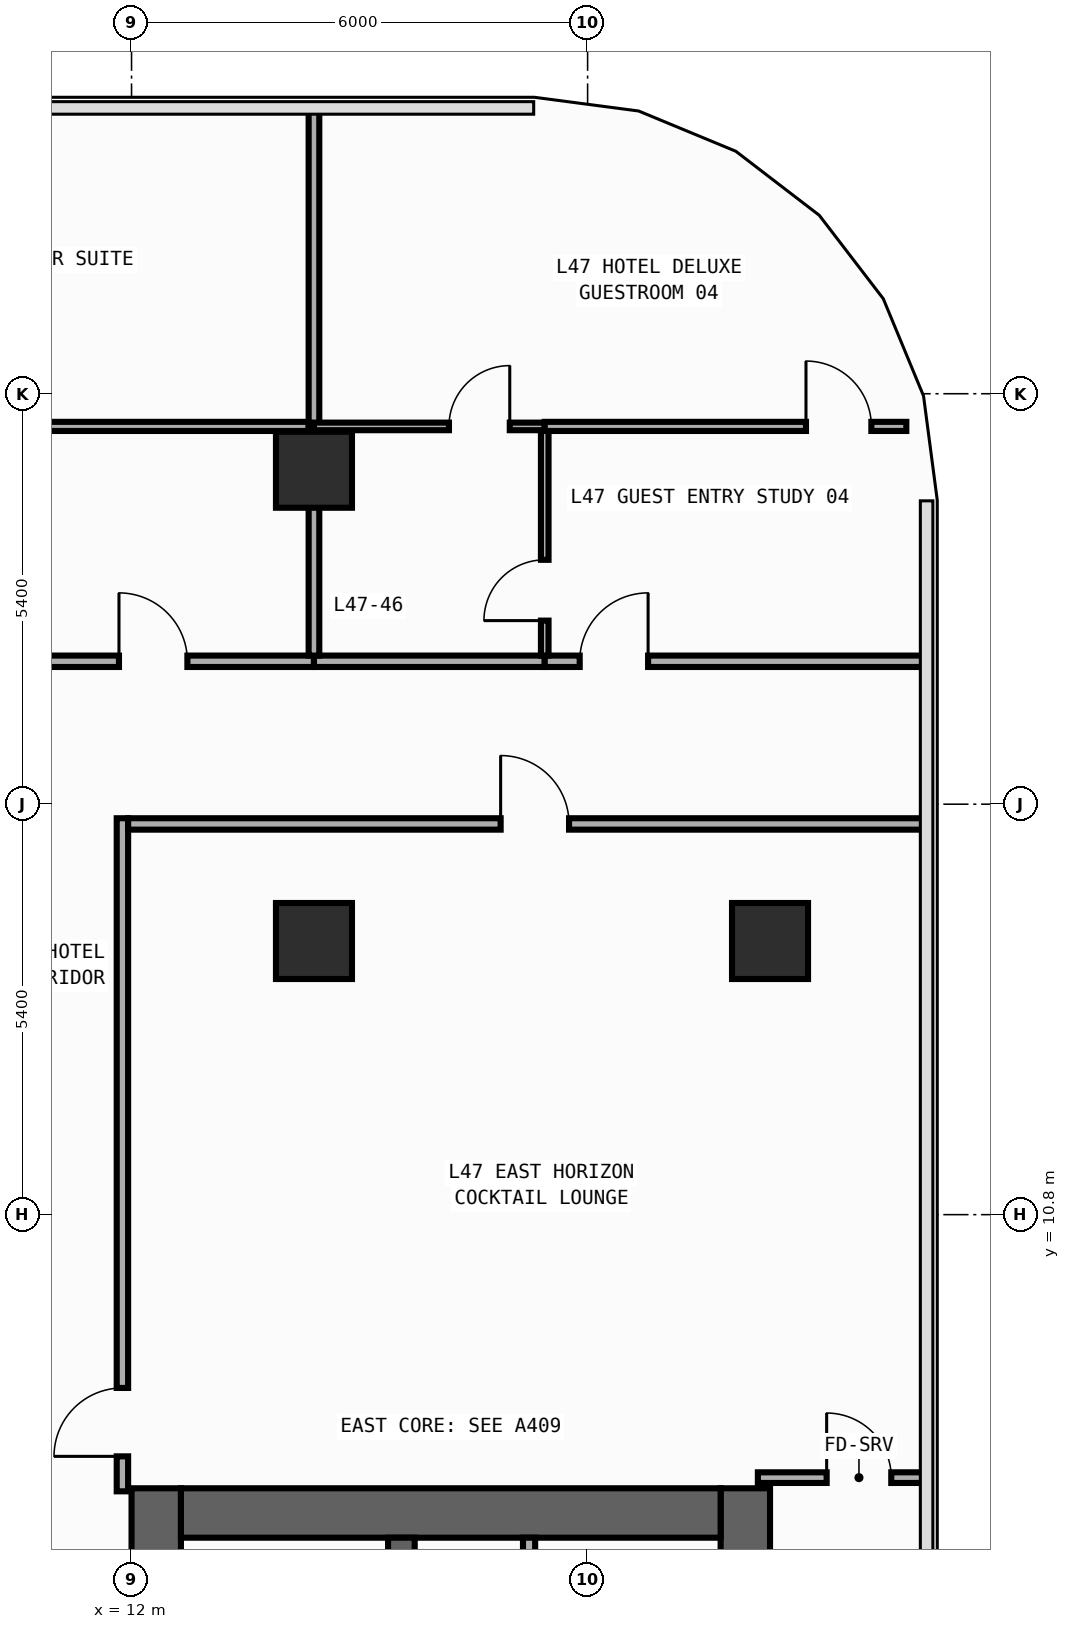
"""IFC4 building model, lengths in metres.
Left out: names, types, materials, properties, quantities, classifications, styles, units other than length and angle.
Written with IfcOpenShell. Run it as: python <this file> out.ifc"""

import sys

from ifc_helpers import new_model, si_unit, direction, frame, frame_2d, origin, origin_2d, place, context, subcontext, project, spatial, rectangle, extrude, element, fill, save


model = new_model("IFC4")
c1 = context("Model", 3, precision=1e-05, world=origin(), true_north=direction((0.0, 1.0)))
c2 = subcontext(c1, "Body", "Model", "MODEL_VIEW")
j1 = project(units=[si_unit("LENGTHUNIT", "METRE"), si_unit("PLANEANGLEUNIT", "RADIAN")], contexts=[c1])
p1 = place(None, origin())
s1 = spatial("IfcSite", under=j1, at=p1, CompositionType="ELEMENT")
p2 = place(p1, origin())
s2 = spatial("IfcBuilding", under=s1, at=p2, CompositionType="ELEMENT")
p3 = place(p2, frame((0.0, 0.0, 203.0)))
s3 = spatial("IfcBuildingStorey", under=s2, at=p3, CompositionType="ELEMENT", Elevation=203.0)
p4 = place(p3, frame((12.325, -19.8, 0.0), z_axis=(0.0, 0.0, 1.0), x_axis=(0.0, 1.0, 0.0)))
e1 = element("IfcWall", 1, at=p4, inside=s3, PredefinedType="SHEAR", context=c2, shape_type="SweptSolid", body=[
    extrude(rectangle(XDim=27.0, YDim=0.65, at=frame_2d((13.5, 0.0))), origin(), (0.0, 0.0, 1.0), 3.54),
])
p5 = place(p4, frame((23.05, 0.0, 0.0)))
e2 = element("IfcOpeningElement", 2, at=p5, cuts=e1, PredefinedType="OPENING", context=c2, shape_type="SweptSolid", body=[
    extrude(rectangle(XDim=1.1, YDim=2.2, at=frame_2d((0.55, 1.1))), frame((0.0, 0.335, 0.0), z_axis=(0.0, -1.0, 0.0), x_axis=(1.0, 0.0, 0.0)), (0.0, 0.0, 1.0), 0.67),
])
p6 = place(p4, frame((19.85, 0.0, 0.0)))
e3 = element("IfcOpeningElement", 3, at=p6, cuts=e1, PredefinedType="OPENING", context=c2, shape_type="SweptSolid", body=[
    extrude(rectangle(XDim=1.1, YDim=2.2, at=frame_2d((0.55, 1.1))), frame((0.0, 0.335, 0.0), z_axis=(0.0, -1.0, 0.0), x_axis=(1.0, 0.0, 0.0)), (0.0, 0.0, 1.0), 0.67),
])
p7 = place(p4, frame((16.65, 0.0, 0.0)))
e4 = element("IfcOpeningElement", 4, at=p7, cuts=e1, PredefinedType="OPENING", context=c2, shape_type="SweptSolid", body=[
    extrude(rectangle(XDim=1.1, YDim=2.2, at=frame_2d((0.55, 1.1))), frame((0.0, 0.335, 0.0), z_axis=(0.0, -1.0, 0.0), x_axis=(1.0, 0.0, 0.0)), (0.0, 0.0, 1.0), 0.67),
])
p8 = place(p4, frame((10.175, 0.0, 0.0)))
e5 = element("IfcOpeningElement", 5, at=p8, cuts=e1, PredefinedType="OPENING", context=c2, shape_type="SweptSolid", body=[
    extrude(rectangle(XDim=0.85, YDim=2.1, at=frame_2d((0.425, 1.05))), frame((0.0, 0.335, 0.0), z_axis=(0.0, -1.0, 0.0), x_axis=(1.0, 0.0, 0.0)), (0.0, 0.0, 1.0), 0.67),
])
p9 = place(p4, frame((12.725, 0.0, 0.0)))
e6 = element("IfcOpeningElement", 6, at=p9, cuts=e1, PredefinedType="OPENING", context=c2, shape_type="SweptSolid", body=[
    extrude(rectangle(XDim=1.15, YDim=2.2, at=frame_2d((0.575, 1.1))), frame((0.0, 0.335, 0.0), z_axis=(0.0, -1.0, 0.0), x_axis=(1.0, 0.0, 0.0)), (0.0, 0.0, 1.0), 0.67),
])
p10 = place(p4, frame((25.125, 0.0, 0.0)))
e7 = element("IfcOpeningElement", 7, at=p10, cuts=e1, PredefinedType="OPENING", context=c2, shape_type="SweptSolid", body=[
    extrude(rectangle(XDim=0.85, YDim=2.1, at=frame_2d((0.425, 1.05))), frame((0.0, 0.335, 0.0), z_axis=(0.0, -1.0, 0.0), x_axis=(1.0, 0.0, 0.0)), (0.0, 0.0, 1.0), 0.67),
])
p11 = place(p3, frame((20.075, -19.8, 0.0), z_axis=(0.0, 0.0, 1.0), x_axis=(0.0, 1.0, 0.0)))
e8 = element("IfcWall", 8, at=p11, inside=s3, PredefinedType="SHEAR", context=c2, shape_type="SweptSolid", body=[
    extrude(rectangle(XDim=27.0, YDim=0.65, at=frame_2d((13.5, 0.0))), origin(), (0.0, 0.0, 1.0), 3.54),
])
p12 = place(p3, frame((12.65, 6.875, 0.0), z_axis=(0.0, 0.0, 1.0), x_axis=(1.0, 0.0, 0.0)))
e9 = element("IfcWall", 9, at=p12, inside=s3, PredefinedType="SHEAR", context=c2, shape_type="SweptSolid", body=[
    extrude(rectangle(XDim=7.1, YDim=0.65, at=frame_2d((3.55, 0.0))), origin(), (0.0, 0.0, 1.0), 3.54),
])
p13 = place(p3, frame((15.55, -19.15, 0.0), z_axis=(0.0, 0.0, 1.0), x_axis=(0.0, 1.0, 0.0)))
e10 = element("IfcWall", 10, at=p13, inside=s3, PredefinedType="SHEAR", context=c2, shape_type="SweptSolid", body=[
    extrude(rectangle(XDim=25.7, YDim=0.35, at=frame_2d((12.85, 0.0))), origin(), (0.0, 0.0, 1.0), 3.54),
])
p14 = place(p13, frame((12.075, 0.0, 0.0)))
e11 = element("IfcOpeningElement", 11, at=p14, cuts=e10, PredefinedType="OPENING", context=c2, shape_type="SweptSolid", body=[
    extrude(rectangle(XDim=1.15, YDim=2.2, at=frame_2d((0.575, 1.1))), frame((0.0, 0.185, 0.0), z_axis=(0.0, -1.0, 0.0), x_axis=(1.0, 0.0, 0.0)), (0.0, 0.0, 1.0), 0.37),
])
p15 = place(p13, frame((24.475, 0.0, 0.0)))
e12 = element("IfcOpeningElement", 12, at=p15, cuts=e10, PredefinedType="OPENING", context=c2, shape_type="SweptSolid", body=[
    extrude(rectangle(XDim=0.85, YDim=2.1, at=frame_2d((0.425, 1.05))), frame((0.0, 0.185, 0.0), z_axis=(0.0, -1.0, 0.0), x_axis=(1.0, 0.0, 0.0)), (0.0, 0.0, 1.0), 0.37),
])
for number, where, z_axis, x_axis in (
    (13, (20.4, 14.4, 0.0), (0.0, 0.0, 1.0), (1.0, 0.0, 0.0)),
    (14, (14.4, 14.4, 0.0), (0.0, 0.0, 1.0), (1.0, 0.0, 0.0)),
    (15, (14.4, 20.6, 0.0), (0.0, 0.0, 1.0), (1.0, 0.0, 0.0)),
):
    element("IfcColumn", number, at=place(p3, frame(where, z_axis=z_axis, x_axis=x_axis)), inside=s3, PredefinedType="COLUMN", context=c2, shape_type="SweptSolid", body=[
        extrude(rectangle(XDim=1.0, YDim=1.0, at=origin_2d()), origin(), (0.0, 0.0, 1.0), 3.8),
    ])
p16 = place(p3, frame((17.23, 4.17, 0.0), z_axis=(0.0, 0.0, 1.0), x_axis=(0.0, 1.0, 0.0)))
e16 = element("IfcWall", 16, at=p16, inside=s3, PredefinedType="PARTITIONING", context=c2, shape_type="SweptSolid", body=[
    extrude(rectangle(XDim=2.38, YDim=0.16, at=frame_2d((1.19, 0.0))), origin(), (0.0, 0.0, 1.0), 3.54),
])
p17 = place(p16, frame((0.46, 0.0, 0.0)))
e17 = element("IfcOpeningElement", 17, at=p17, cuts=e16, PredefinedType="OPENING", context=c2, shape_type="SweptSolid", body=[
    extrude(rectangle(XDim=0.85, YDim=2.1, at=frame_2d((0.425, 1.05))), frame((0.0, 0.09, 0.0), z_axis=(0.0, -1.0, 0.0), x_axis=(1.0, 0.0, 0.0)), (0.0, 0.0, 1.0), 0.18),
])
p18 = place(p3, frame((11.88, 7.16, 0.0), z_axis=(0.0, 0.0, 1.0), x_axis=(0.0, 1.0, 0.0)))
e18 = element("IfcWall", 18, at=p18, inside=s3, PredefinedType="PARTITIONING", context=c2, shape_type="SweptSolid", body=[
    extrude(rectangle(XDim=8.855, YDim=0.15, at=frame_2d((4.427, 0.0))), origin(), (0.0, 0.0, 1.0), 3.54),
])
p19 = place(p18, frame((0.46, 0.0, 0.0)))
e19 = element("IfcOpeningElement", 19, at=p19, cuts=e18, PredefinedType="OPENING", context=c2, shape_type="SweptSolid", body=[
    extrude(rectangle(XDim=0.9, YDim=2.15, at=frame_2d((0.45, 1.075))), frame((0.0, 0.085, 0.0), z_axis=(0.0, -1.0, 0.0), x_axis=(1.0, 0.0, 0.0)), (0.0, 0.0, 1.0), 0.17),
])
p20 = place(p3, frame((3.54, 18.08, 0.0), z_axis=(0.0, 0.0, 1.0), x_axis=(1.0, 0.0, 0.0)))
e20 = element("IfcWall", 20, at=p20, inside=s3, PredefinedType="PARTITIONING", context=c2, shape_type="SweptSolid", body=[
    extrude(rectangle(XDim=10.86, YDim=0.15, at=frame_2d((5.43, 0.0))), origin(), (0.0, 0.0, 1.0), 3.54),
])
p21 = place(p20, frame((8.295, 0.0, 0.0)))
e21 = element("IfcOpeningElement", 21, at=p21, cuts=e20, PredefinedType="OPENING", context=c2, shape_type="SweptSolid", body=[
    extrude(rectangle(XDim=0.9, YDim=2.15, at=frame_2d((0.45, 1.075))), frame((0.0, 0.085, 0.0), z_axis=(0.0, -1.0, 0.0), x_axis=(1.0, 0.0, 0.0)), (0.0, 0.0, 1.0), 0.17),
])
p22 = place(p3, frame((14.4, 18.08, 0.0), z_axis=(0.0, 0.0, 1.0), x_axis=(1.0, 0.0, 0.0)))
e22 = element("IfcWall", 22, at=p22, inside=s3, PredefinedType="PARTITIONING", context=c2, shape_type="SweptSolid", body=[
    extrude(rectangle(XDim=3.036, YDim=0.15, at=frame_2d((1.518, 0.0))), origin(), (0.0, 0.0, 1.0), 3.54),
])
p23 = place(p3, frame((17.436, 18.08, 0.0), z_axis=(0.0, 0.0, 1.0), x_axis=(1.0, 0.0, 0.0)))
e23 = element("IfcWall", 23, at=p23, inside=s3, PredefinedType="PARTITIONING", context=c2, shape_type="SweptSolid", body=[
    extrude(rectangle(XDim=5.019, YDim=0.15, at=frame_2d((2.51, 0.0))), origin(), (0.0, 0.0, 1.0), 3.54),
])
p24 = place(p23, frame((0.46, 0.0, 0.0)))
e24 = element("IfcOpeningElement", 24, at=p24, cuts=e23, PredefinedType="OPENING", context=c2, shape_type="SweptSolid", body=[
    extrude(rectangle(XDim=0.9, YDim=2.15, at=frame_2d((0.45, 1.075))), frame((0.0, 0.085, 0.0), z_axis=(0.0, -1.0, 0.0), x_axis=(1.0, 0.0, 0.0)), (0.0, 0.0, 1.0), 0.17),
])
p25 = place(p3, frame((11.955, 15.94, 0.0), z_axis=(0.0, 0.0, 1.0), x_axis=(1.0, 0.0, 0.0)))
e25 = element("IfcWall", 25, at=p25, inside=s3, PredefinedType="PARTITIONING", context=c2, shape_type="SweptSolid", body=[
    extrude(rectangle(XDim=10.5, YDim=0.15, at=frame_2d((5.25, 0.0))), origin(), (0.0, 0.0, 1.0), 3.54),
])
p26 = place(p25, frame((4.901, 0.0, 0.0)))
e26 = element("IfcOpeningElement", 26, at=p26, cuts=e25, PredefinedType="OPENING", context=c2, shape_type="SweptSolid", body=[
    extrude(rectangle(XDim=0.9, YDim=2.15, at=frame_2d((0.45, 1.075))), frame((0.0, 0.085, 0.0), z_axis=(0.0, -1.0, 0.0), x_axis=(1.0, 0.0, 0.0)), (0.0, 0.0, 1.0), 0.17),
])
p27 = place(p3, frame((3.54, 21.17, 0.0), z_axis=(0.0, 0.0, 1.0), x_axis=(1.0, 0.0, 0.0)))
e27 = element("IfcWall", 27, at=p27, inside=s3, PredefinedType="PARTITIONING", context=c2, shape_type="SweptSolid", body=[
    extrude(rectangle(XDim=10.86, YDim=0.12, at=frame_2d((5.43, 0.0))), origin(), (0.0, 0.0, 1.0), 3.54),
])
p28 = place(p27, frame((3.083, 0.0, 0.0)))
e28 = element("IfcOpeningElement", 28, at=p28, cuts=e27, PredefinedType="OPENING", context=c2, shape_type="SweptSolid", body=[
    extrude(rectangle(XDim=0.86, YDim=2.15, at=frame_2d((0.43, 1.075))), frame((0.0, 0.07, 0.0), z_axis=(0.0, -1.0, 0.0), x_axis=(1.0, 0.0, 0.0)), (0.0, 0.0, 1.0), 0.14),
])
p29 = place(p3, frame((14.4, 18.155, 0.0), z_axis=(0.0, 0.0, 1.0), x_axis=(0.0, 1.0, 0.0)))
e29 = element("IfcWall", 29, at=p29, inside=s3, PredefinedType="PARTITIONING", context=c2, shape_type="SweptSolid", body=[
    extrude(rectangle(XDim=3.015, YDim=0.14, at=frame_2d((1.507, 0.0))), origin(), (0.0, 0.0, 1.0), 2.952),
])
p30 = place(p3, frame((14.4, 21.17, 0.0), z_axis=(0.0, 0.0, 1.0), x_axis=(0.0, 1.0, 0.0)))
e30 = element("IfcWall", 30, at=p30, inside=s3, PredefinedType="PARTITIONING", context=c2, shape_type="SweptSolid", body=[
    extrude(rectangle(XDim=4.185, YDim=0.14, at=frame_2d((2.093, 0.0))), origin(), (0.0, 0.0, 1.0), 3.54),
])
p31 = place(p3, frame((17.436, 18.155, 0.0), z_axis=(0.0, 0.0, 1.0), x_axis=(0.0, 1.0, 0.0)))
e31 = element("IfcWall", 31, at=p31, inside=s3, PredefinedType="PARTITIONING", context=c2, shape_type="SweptSolid", body=[
    extrude(rectangle(XDim=2.965, YDim=0.1, at=frame_2d((1.482, 0.0))), origin(), (0.0, 0.0, 1.0), 3.54),
])
p32 = place(p31, frame((0.46, 0.0, 0.0)))
e32 = element("IfcOpeningElement", 32, at=p32, cuts=e31, PredefinedType="OPENING", context=c2, shape_type="SweptSolid", body=[
    extrude(rectangle(XDim=0.8, YDim=2.1, at=frame_2d((0.4, 1.05))), frame((0.0, 0.06, 0.0), z_axis=(0.0, -1.0, 0.0), x_axis=(1.0, 0.0, 0.0)), (0.0, 0.0, 1.0), 0.12),
])
p33 = place(p3, frame((14.4, 21.17, 0.0), z_axis=(0.0, 0.0, 1.0), x_axis=(1.0, 0.0, 0.0)))
e33 = element("IfcWall", 33, at=p33, inside=s3, PredefinedType="PARTITIONING", context=c2, shape_type="SweptSolid", body=[
    extrude(rectangle(XDim=3.036, YDim=0.1, at=frame_2d((1.518, 0.0))), origin(), (0.0, 0.0, 1.0), 3.54),
])
p34 = place(p33, frame((1.776, 0.0, 0.0)))
e34 = element("IfcOpeningElement", 34, at=p34, cuts=e33, PredefinedType="OPENING", context=c2, shape_type="SweptSolid", body=[
    extrude(rectangle(XDim=0.8, YDim=2.1, at=frame_2d((0.4, 1.05))), frame((0.0, 0.06, 0.0), z_axis=(0.0, -1.0, 0.0), x_axis=(1.0, 0.0, 0.0)), (0.0, 0.0, 1.0), 0.12),
])
p35 = place(p3, frame((17.436, 21.17, 0.0), z_axis=(0.0, 0.0, 1.0), x_axis=(1.0, 0.0, 0.0)))
e35 = element("IfcWall", 35, at=p35, inside=s3, PredefinedType="PARTITIONING", context=c2, shape_type="SweptSolid", body=[
    extrude(rectangle(XDim=4.757, YDim=0.12, at=frame_2d((2.378, 0.0))), origin(), (0.0, 0.0, 1.0), 3.54),
])
p36 = place(p35, frame((3.437, 0.0, 0.0)))
e36 = element("IfcOpeningElement", 36, at=p36, cuts=e35, PredefinedType="OPENING", context=c2, shape_type="SweptSolid", body=[
    extrude(rectangle(XDim=0.86, YDim=2.15, at=frame_2d((0.43, 1.075))), frame((0.0, 0.07, 0.0), z_axis=(0.0, -1.0, 0.0), x_axis=(1.0, 0.0, 0.0)), (0.0, 0.0, 1.0), 0.14),
])
p37 = place(p3, frame((20.24, 7.34, 0.0), z_axis=(0.0, 0.0, 1.0), x_axis=(1.0, 0.0, 0.0)))
e37 = element("IfcWall", 37, at=p37, inside=s3, PredefinedType="PARTITIONING", context=c2, shape_type="SweptSolid", body=[
    extrude(rectangle(XDim=2.215, YDim=0.14, at=frame_2d((1.107, 0.0))), origin(), (0.0, 0.0, 1.0), 3.54),
])
p38 = place(p37, frame((0.905, 0.0, 0.0)))
e38 = element("IfcOpeningElement", 38, at=p38, cuts=e37, PredefinedType="OPENING", context=c2, shape_type="SweptSolid", body=[
    extrude(rectangle(XDim=0.85, YDim=2.1, at=frame_2d((0.425, 1.05))), frame((0.0, 0.08, 0.0), z_axis=(0.0, -1.0, 0.0), x_axis=(1.0, 0.0, 0.0)), (0.0, 0.0, 1.0), 0.16),
])
p39 = place(p19, origin())
e39 = element("IfcDoor", 39, at=p39, inside=s3, OperationType="SINGLE_SWING_LEFT", PredefinedType="DOOR", context=c2, shape_type="SweptSolid", body=[
    extrude(rectangle(XDim=0.9, YDim=2.15, at=frame_2d((0.45, 1.075))), frame((0.0, 0.025, 0.0), z_axis=(0.0, -1.0, 0.0), x_axis=(1.0, 0.0, 0.0)), (0.0, 0.0, 1.0), 0.05),
])
fill(e19, e39)
p40 = place(p21, origin())
e40 = element("IfcDoor", 40, at=p40, inside=s3, OperationType="SINGLE_SWING_LEFT", PredefinedType="DOOR", context=c2, shape_type="SweptSolid", body=[
    extrude(rectangle(XDim=0.9, YDim=2.15, at=frame_2d((0.45, 1.075))), frame((0.0, 0.025, 0.0), z_axis=(0.0, -1.0, 0.0), x_axis=(1.0, 0.0, 0.0)), (0.0, 0.0, 1.0), 0.05),
])
fill(e21, e40)
p41 = place(p24, origin())
e41 = element("IfcDoor", 41, at=p41, inside=s3, OperationType="SINGLE_SWING_RIGHT", PredefinedType="DOOR", context=c2, shape_type="SweptSolid", body=[
    extrude(rectangle(XDim=0.9, YDim=2.15, at=frame_2d((0.45, 1.075))), frame((0.0, 0.025, 0.0), z_axis=(0.0, -1.0, 0.0), x_axis=(1.0, 0.0, 0.0)), (0.0, 0.0, 1.0), 0.05),
])
fill(e24, e41)
p42 = place(p26, origin())
e42 = element("IfcDoor", 42, at=p42, inside=s3, OperationType="SINGLE_SWING_LEFT", PredefinedType="DOOR", context=c2, shape_type="SweptSolid", body=[
    extrude(rectangle(XDim=0.9, YDim=2.15, at=frame_2d((0.45, 1.075))), frame((0.0, 0.025, 0.0), z_axis=(0.0, -1.0, 0.0), x_axis=(1.0, 0.0, 0.0)), (0.0, 0.0, 1.0), 0.05),
])
fill(e26, e42)
p43 = place(p32, origin())
e43 = element("IfcDoor", 43, at=p43, inside=s3, OperationType="SINGLE_SWING_LEFT", PredefinedType="DOOR", context=c2, shape_type="SweptSolid", body=[
    extrude(rectangle(XDim=0.8, YDim=2.1, at=frame_2d((0.4, 1.05))), frame((0.0, 0.025, 0.0), z_axis=(0.0, -1.0, 0.0), x_axis=(1.0, 0.0, 0.0)), (0.0, 0.0, 1.0), 0.05),
])
fill(e32, e43)
p44 = place(p34, origin())
e44 = element("IfcDoor", 44, at=p44, inside=s3, OperationType="SINGLE_SWING_RIGHT", PredefinedType="DOOR", context=c2, shape_type="SweptSolid", body=[
    extrude(rectangle(XDim=0.8, YDim=2.1, at=frame_2d((0.4, 1.05))), frame((0.0, 0.025, 0.0), z_axis=(0.0, -1.0, 0.0), x_axis=(1.0, 0.0, 0.0)), (0.0, 0.0, 1.0), 0.05),
])
fill(e34, e44)
p45 = place(p36, origin())
e45 = element("IfcDoor", 45, at=p45, inside=s3, OperationType="SINGLE_SWING_LEFT", PredefinedType="DOOR", context=c2, shape_type="SweptSolid", body=[
    extrude(rectangle(XDim=0.86, YDim=2.15, at=frame_2d((0.43, 1.075))), frame((0.0, 0.025, 0.0), z_axis=(0.0, -1.0, 0.0), x_axis=(1.0, 0.0, 0.0)), (0.0, 0.0, 1.0), 0.05),
])
fill(e36, e45)
p46 = place(p38, origin())
e46 = element("IfcDoor", 46, at=p46, inside=s3, OperationType="SINGLE_SWING_LEFT", PredefinedType="DOOR", context=c2, shape_type="SweptSolid", body=[
    extrude(rectangle(XDim=0.85, YDim=2.1, at=frame_2d((0.425, 1.05))), frame((0.0, 0.025, 0.0), z_axis=(0.0, -1.0, 0.0), x_axis=(1.0, 0.0, 0.0)), (0.0, 0.0, 1.0), 0.05),
])
fill(e38, e46)
save(model, sys.argv[1])
